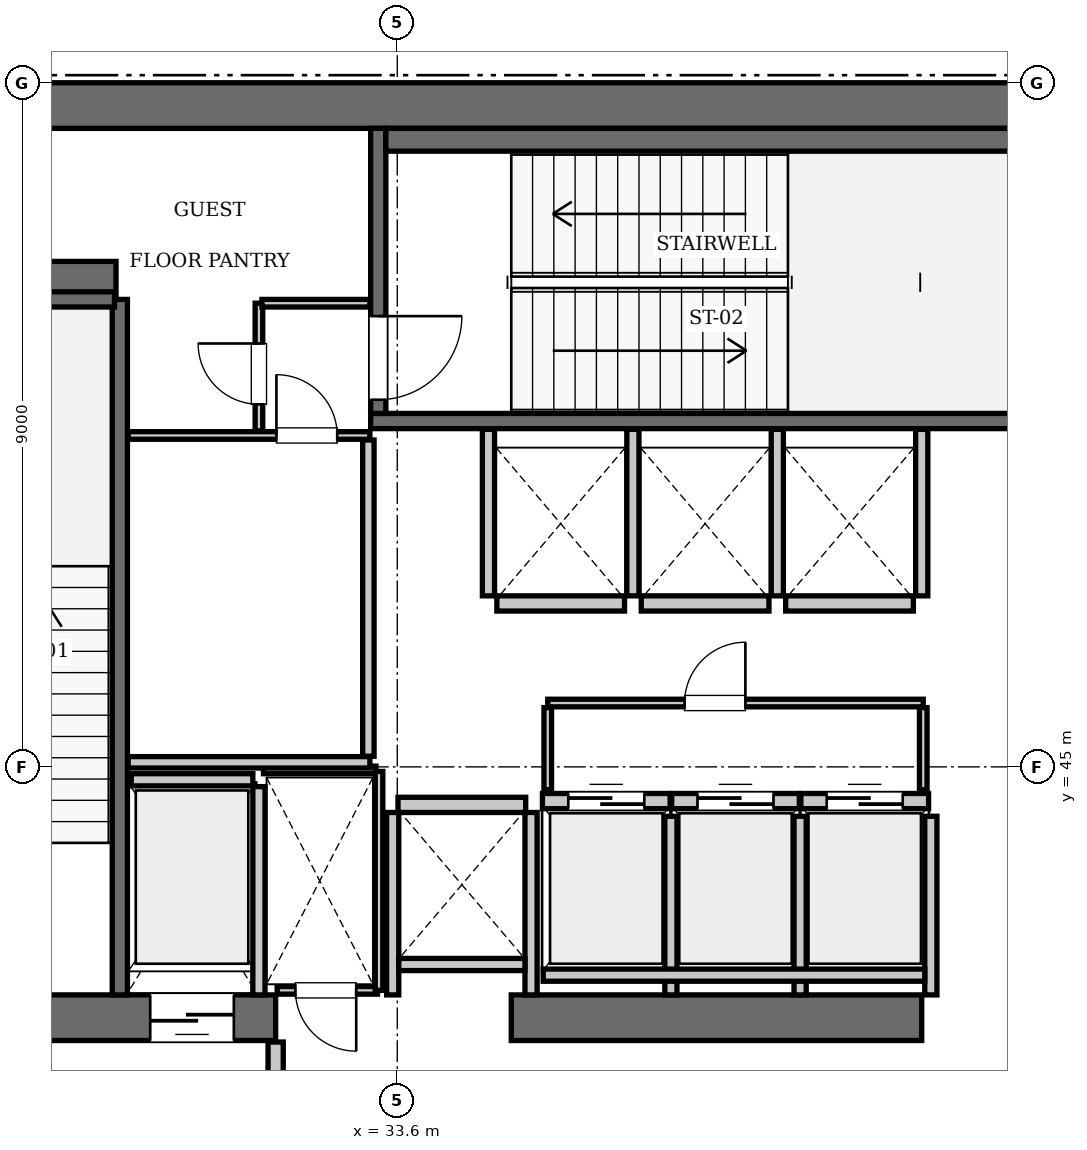
"""IFC4 building model, lengths in metres.
Left out: names, types, materials, properties, quantities, classifications, styles, units other than length and angle.
Written with IfcOpenShell. Run it as: python <this file> out.ifc"""

import sys

from ifc_helpers import new_model, si_unit, direction, frame, frame_2d, origin, place, context, subcontext, project, spatial, rectangle, extrude, element, fill, save


model = new_model("IFC4")
c1 = context("Model", 3, precision=1e-05, world=origin(), true_north=direction((0.0, 1.0)))
c2 = subcontext(c1, "Body", "Model", "MODEL_VIEW")
j1 = project(units=[si_unit("LENGTHUNIT", "METRE"), si_unit("PLANEANGLEUNIT", "RADIAN")], contexts=[c1])
p1 = place(None, origin())
s1 = spatial("IfcSite", under=j1, at=p1, CompositionType="ELEMENT")
p2 = place(p1, origin())
s2 = spatial("IfcBuilding", under=s1, at=p2, CompositionType="ELEMENT")
p3 = place(p2, frame((0.0, 0.0, 234.5)))
s3 = spatial("IfcBuildingStorey", under=s2, at=p3, CompositionType="ELEMENT", Elevation=234.5)
p4 = place(p3, frame((25.2, 53.7, 0.0), z_axis=(0.0, 0.0, 1.0), x_axis=(1.0, 0.0, 0.0)))
e1 = element("IfcWall", 1, at=p4, inside=s3, PredefinedType="SHEAR", context=c2, shape_type="SweptSolid", body=[
    extrude(rectangle(XDim=25.2, YDim=0.6, at=frame_2d((12.6, 0.0))), origin(), (0.0, 0.0, 1.0), 4.9),
])
p5 = place(p3, frame((25.2, 41.7, 0.0), z_axis=(0.0, 0.0, 1.0), x_axis=(1.0, 0.0, 0.0)))
e2 = element("IfcWall", 2, at=p5, inside=s3, PredefinedType="SHEAR", context=c2, shape_type="SweptSolid", body=[
    extrude(rectangle(XDim=6.8, YDim=0.6, at=frame_2d((3.4, 0.0))), origin(), (0.0, 0.0, 1.0), 4.9),
])
p6 = place(p5, frame((1.65, 0.0, 0.0)))
e3 = element("IfcOpeningElement", 3, at=p6, cuts=e2, PredefinedType="OPENING", context=c2, shape_type="SweptSolid", body=[
    extrude(rectangle(XDim=1.15, YDim=2.15, at=frame_2d((0.575, 1.075))), frame((0.0, 0.31, 0.0), z_axis=(0.0, -1.0, 0.0), x_axis=(1.0, 0.0, 0.0)), (0.0, 0.0, 1.0), 0.62),
])
p7 = place(p5, frame((5.15, 0.0, 0.0)))
e4 = element("IfcOpeningElement", 4, at=p7, cuts=e2, PredefinedType="OPENING", context=c2, shape_type="SweptSolid", body=[
    extrude(rectangle(XDim=1.1, YDim=2.2, at=frame_2d((0.55, 1.1))), frame((0.0, 0.31, 0.0), z_axis=(0.0, -1.0, 0.0), x_axis=(1.0, 0.0, 0.0)), (0.0, 0.0, 1.0), 0.62),
])
p8 = place(p3, frame((35.1, 41.7, 0.0), z_axis=(0.0, 0.0, 1.0), x_axis=(1.0, 0.0, 0.0)))
e5 = element("IfcWall", 5, at=p8, inside=s3, PredefinedType="SHEAR", context=c2, shape_type="SweptSolid", body=[
    extrude(rectangle(XDim=5.4, YDim=0.6, at=frame_2d((2.7, 0.0))), origin(), (0.0, 0.0, 1.0), 4.9),
])
p9 = place(p3, frame((25.8, 51.4, 0.0), z_axis=(0.0, 0.0, 1.0), x_axis=(1.0, 0.0, 0.0)))
e6 = element("IfcWall", 6, at=p9, inside=s3, PredefinedType="SHEAR", context=c2, shape_type="SweptSolid", body=[
    extrude(rectangle(XDim=4.1, YDim=0.5, at=frame_2d((2.05, 0.0))), origin(), (0.0, 0.0, 1.0), 4.9),
])
p10 = place(p3, frame((29.95, 42.0, 0.0), z_axis=(0.0, 0.0, 1.0), x_axis=(0.0, 1.0, 0.0)))
e7 = element("IfcWall", 7, at=p10, inside=s3, PredefinedType="SOLIDWALL", context=c2, shape_type="SweptSolid", body=[
    extrude(rectangle(XDim=9.15, YDim=0.2, at=frame_2d((4.575, 0.0))), origin(), (0.0, 0.0, 1.0), 4.66),
])
p11 = place(p3, frame((26.38, 51.15, 0.0), z_axis=(0.0, 0.0, 1.0), x_axis=(1.0, 0.0, 0.0)))
e8 = element("IfcWall", 8, at=p11, inside=s3, PredefinedType="SOLIDWALL", context=c2, shape_type="SweptSolid", body=[
    extrude(rectangle(XDim=3.5, YDim=0.2, at=frame_2d((1.75, 0.0))), origin(), (0.0, 0.0, 1.0), 4.66),
])
p12 = place(p3, frame((33.25, 49.55, 0.0), z_axis=(0.0, 0.0, 1.0), x_axis=(1.0, 0.0, 0.0)))
e9 = element("IfcWall", 9, at=p12, inside=s3, PredefinedType="SOLIDWALL", context=c2, shape_type="SweptSolid", body=[
    extrude(rectangle(XDim=9.1, YDim=0.2, at=frame_2d((4.55, 0.0))), origin(), (0.0, 0.0, 1.0), 4.66),
])
p13 = place(p3, frame((33.35, 49.65, 0.0), z_axis=(0.0, 0.0, 1.0), x_axis=(0.0, 1.0, 0.0)))
e10 = element("IfcWall", 10, at=p13, inside=s3, PredefinedType="SOLIDWALL", context=c2, shape_type="SweptSolid", body=[
    extrude(rectangle(XDim=3.75, YDim=0.2, at=frame_2d((1.875, 0.0))), origin(), (0.0, 0.0, 1.0), 4.66),
])
p14 = place(p13, frame((0.18, 0.0, 0.0)))
e11 = element("IfcOpeningElement", 11, at=p14, cuts=e10, PredefinedType="OPENING", context=c2, shape_type="SweptSolid", body=[
    extrude(rectangle(XDim=1.1, YDim=2.15, at=frame_2d((0.55, 1.075))), frame((0.0, 0.11, 0.0), z_axis=(0.0, -1.0, 0.0), x_axis=(1.0, 0.0, 0.0)), (0.0, 0.0, 1.0), 0.22),
])
p15 = place(p3, frame((33.45, 53.25, 0.0), z_axis=(0.0, 0.0, 1.0), x_axis=(1.0, 0.0, 0.0)))
e12 = element("IfcWall", 12, at=p15, inside=s3, PredefinedType="SOLIDWALL", context=c2, shape_type="SweptSolid", body=[
    extrude(rectangle(XDim=8.7, YDim=0.3, at=frame_2d((4.35, 0.0))), origin(), (0.0, 0.0, 1.0), 4.66),
])
p16 = place(p3, frame((35.51, 44.55, 0.0), z_axis=(0.0, 0.0, 1.0), x_axis=(1.0, 0.0, 0.0)))
e13 = element("IfcWall", 13, at=p16, inside=s3, PredefinedType="SOLIDWALL", context=c2, shape_type="SweptSolid", body=[
    extrude(rectangle(XDim=1.68, YDim=0.2, at=frame_2d((0.84, 0.0))), origin(), (0.0, 0.0, 1.0), 4.66),
])
p17 = place(p16, frame((0.34, 0.0, 0.0)))
e14 = element("IfcOpeningElement", 14, at=p17, cuts=e13, PredefinedType="OPENING", context=c2, shape_type="SweptSolid", body=[
    extrude(rectangle(XDim=1.0, YDim=2.15, at=frame_2d((0.5, 1.075))), frame((0.0, 0.11, 0.0), z_axis=(0.0, -1.0, 0.0), x_axis=(1.0, 0.0, 0.0)), (0.0, 0.0, 1.0), 0.22),
])
p18 = place(p3, frame((37.21, 44.55, 0.0), z_axis=(0.0, 0.0, 1.0), x_axis=(1.0, 0.0, 0.0)))
e15 = element("IfcWall", 15, at=p18, inside=s3, PredefinedType="SOLIDWALL", context=c2, shape_type="SweptSolid", body=[
    extrude(rectangle(XDim=1.68, YDim=0.2, at=frame_2d((0.84, 0.0))), origin(), (0.0, 0.0, 1.0), 4.66),
])
p19 = place(p18, frame((0.34, 0.0, 0.0)))
e16 = element("IfcOpeningElement", 16, at=p19, cuts=e15, PredefinedType="OPENING", context=c2, shape_type="SweptSolid", body=[
    extrude(rectangle(XDim=1.0, YDim=2.15, at=frame_2d((0.5, 1.075))), frame((0.0, 0.11, 0.0), z_axis=(0.0, -1.0, 0.0), x_axis=(1.0, 0.0, 0.0)), (0.0, 0.0, 1.0), 0.22),
])
p20 = place(p3, frame((38.91, 44.55, 0.0), z_axis=(0.0, 0.0, 1.0), x_axis=(1.0, 0.0, 0.0)))
e17 = element("IfcWall", 17, at=p20, inside=s3, PredefinedType="SOLIDWALL", context=c2, shape_type="SweptSolid", body=[
    extrude(rectangle(XDim=1.68, YDim=0.2, at=frame_2d((0.84, 0.0))), origin(), (0.0, 0.0, 1.0), 4.66),
])
p21 = place(p20, frame((0.34, 0.0, 0.0)))
e18 = element("IfcOpeningElement", 18, at=p21, cuts=e17, PredefinedType="OPENING", context=c2, shape_type="SweptSolid", body=[
    extrude(rectangle(XDim=1.0, YDim=2.15, at=frame_2d((0.5, 1.075))), frame((0.0, 0.11, 0.0), z_axis=(0.0, -1.0, 0.0), x_axis=(1.0, 0.0, 0.0)), (0.0, 0.0, 1.0), 0.22),
])
p22 = place(p3, frame((34.91, 47.15, 0.0), z_axis=(0.0, 0.0, 1.0), x_axis=(1.0, 0.0, 0.0)))
e19 = element("IfcWall", 19, at=p22, inside=s3, PredefinedType="SOLIDWALL", context=c2, shape_type="SweptSolid", body=[
    extrude(rectangle(XDim=1.68, YDim=0.2, at=frame_2d((0.84, 0.0))), origin(), (0.0, 0.0, 1.0), 4.66),
])
for number, where, z_axis, x_axis in (
    (20, (36.81, 47.15, 0.0), (0.0, 0.0, 1.0), (1.0, 0.0, 0.0)),
    (21, (38.71, 47.15, 0.0), (0.0, 0.0, 1.0), (1.0, 0.0, 0.0)),
    (22, (33.61, 44.5, 0.0), (0.0, 0.0, 1.0), (1.0, 0.0, 0.0)),
):
    element("IfcWall", number, at=place(p3, frame(where, z_axis=z_axis, x_axis=x_axis)), inside=s3, PredefinedType="SOLIDWALL", context=c2, shape_type="SweptSolid", body=[
        extrude(rectangle(XDim=1.68, YDim=0.2, at=frame_2d((0.84, 0.0))), origin(), (0.0, 0.0, 1.0), 4.66),
    ])
p23 = place(p3, frame((30.1, 44.83, 0.0), z_axis=(0.0, 0.0, 1.0), x_axis=(1.0, 0.0, 0.0)))
e23 = element("IfcWall", 23, at=p23, inside=s3, PredefinedType="SOLIDWALL", context=c2, shape_type="SweptSolid", body=[
    extrude(rectangle(XDim=1.6, YDim=0.16, at=frame_2d((0.8, 0.0))), origin(), (0.0, 0.0, 1.0), 4.66),
])
p24 = place(p3, frame((31.78, 42.0, 0.0), z_axis=(0.0, 0.0, 1.0), x_axis=(0.0, 1.0, 0.0)))
e24 = element("IfcWall", 24, at=p24, inside=s3, PredefinedType="SOLIDWALL", context=c2, shape_type="SweptSolid", body=[
    extrude(rectangle(XDim=2.74, YDim=0.16, at=frame_2d((1.37, 0.0))), origin(), (0.0, 0.0, 1.0), 4.66),
])
for number, where, z_axis, x_axis in (
    (25, (37.2, 42.0, 0.0), (0.0, 0.0, 1.0), (0.0, 1.0, 0.0)),
    (26, (38.9, 42.0, 0.0), (0.0, 0.0, 1.0), (0.0, 1.0, 0.0)),
    (27, (40.62, 42.0, 0.0), (0.0, 0.0, 1.0), (0.0, 1.0, 0.0)),
):
    element("IfcWall", number, at=place(p3, frame(where, z_axis=z_axis, x_axis=x_axis)), inside=s3, PredefinedType="SOLIDWALL", context=c2, shape_type="SweptSolid", body=[
        extrude(rectangle(XDim=2.35, YDim=0.16, at=frame_2d((1.175, 0.0))), origin(), (0.0, 0.0, 1.0), 4.66),
    ])
p25 = place(p3, frame((35.52, 42.26, 0.0), z_axis=(0.0, 0.0, 1.0), x_axis=(1.0, 0.0, 0.0)))
e28 = element("IfcWall", 28, at=p25, inside=s3, PredefinedType="SOLIDWALL", context=c2, shape_type="SweptSolid", body=[
    extrude(rectangle(XDim=5.02, YDim=0.16, at=frame_2d((2.51, 0.0))), origin(), (0.0, 0.0, 1.0), 4.66),
])
for number, where, z_axis, x_axis in (
    (29, (34.8, 47.25, 0.0), (0.0, 0.0, 1.0), (0.0, 1.0, 0.0)),
    (30, (36.7, 47.25, 0.0), (0.0, 0.0, 1.0), (0.0, 1.0, 0.0)),
    (31, (38.6, 47.25, 0.0), (0.0, 0.0, 1.0), (0.0, 1.0, 0.0)),
    (32, (40.5, 47.25, 0.0), (0.0, 0.0, 1.0), (0.0, 1.0, 0.0)),
):
    element("IfcWall", number, at=place(p3, frame(where, z_axis=z_axis, x_axis=x_axis)), inside=s3, PredefinedType="SOLIDWALL", context=c2, shape_type="SweptSolid", body=[
        extrude(rectangle(XDim=2.19, YDim=0.16, at=frame_2d((1.095, 0.0))), origin(), (0.0, 0.0, 1.0), 4.66),
    ])
for number, where, z_axis, x_axis in (
    (33, (33.54, 42.0, 0.0), (0.0, 0.0, 1.0), (0.0, 1.0, 0.0)),
    (34, (35.36, 42.0, 0.0), (0.0, 0.0, 1.0), (0.0, 1.0, 0.0)),
):
    element("IfcWall", number, at=place(p3, frame(where, z_axis=z_axis, x_axis=x_axis)), inside=s3, PredefinedType="SOLIDWALL", context=c2, shape_type="SweptSolid", body=[
        extrude(rectangle(XDim=2.4, YDim=0.16, at=frame_2d((1.2, 0.0))), origin(), (0.0, 0.0, 1.0), 4.66),
    ])
p26 = place(p3, frame((33.62, 42.4, 0.0), z_axis=(0.0, 0.0, 1.0), x_axis=(1.0, 0.0, 0.0)))
e35 = element("IfcWall", 35, at=p26, inside=s3, PredefinedType="SOLIDWALL", context=c2, shape_type="SweptSolid", body=[
    extrude(rectangle(XDim=1.66, YDim=0.16, at=frame_2d((0.83, 0.0))), origin(), (0.0, 0.0, 1.0), 4.66),
])
p27 = place(p3, frame((32.0, 38.31, 0.0), z_axis=(0.0, 0.0, 1.0), x_axis=(0.0, 1.0, 0.0)))
e36 = element("IfcWall", 36, at=p27, inside=s3, PredefinedType="PARTITIONING", context=c2, shape_type="SweptSolid", body=[
    extrude(rectangle(XDim=3.07, YDim=0.2, at=frame_2d((1.535, 0.0))), origin(), (0.0, 0.0, 1.0), 4.66),
])
p28 = place(p3, frame((32.02, 42.06, 0.0), z_axis=(0.0, 0.0, 1.0), x_axis=(1.0, 0.0, 0.0)))
e37 = element("IfcWall", 37, at=p28, inside=s3, PredefinedType="PARTITIONING", context=c2, shape_type="SweptSolid", body=[
    extrude(rectangle(XDim=1.32, YDim=0.1, at=frame_2d((0.66, 0.0))), origin(), (0.0, 0.0, 1.0), 4.66),
])
p29 = place(p28, frame((0.24, 0.0, 0.0)))
e38 = element("IfcOpeningElement", 38, at=p29, cuts=e37, PredefinedType="OPENING", context=c2, shape_type="SweptSolid", body=[
    extrude(rectangle(XDim=0.8, YDim=2.05, at=frame_2d((0.4, 1.025))), frame((0.0, 0.06, 0.0), z_axis=(0.0, -1.0, 0.0), x_axis=(1.0, 0.0, 0.0)), (0.0, 0.0, 1.0), 0.12),
])
p30 = place(p3, frame((31.84, 44.96, 0.0), z_axis=(0.0, 0.0, 1.0), x_axis=(1.0, 0.0, 0.0)))
e39 = element("IfcWall", 39, at=p30, inside=s3, PredefinedType="PARTITIONING", context=c2, shape_type="SweptSolid", body=[
    extrude(rectangle(XDim=1.48, YDim=0.1, at=frame_2d((0.74, 0.0))), origin(), (0.0, 0.0, 1.0), 4.66),
])
p31 = place(p3, frame((33.36, 42.06, 0.0), z_axis=(0.0, 0.0, 1.0), x_axis=(0.0, 1.0, 0.0)))
e40 = element("IfcWall", 40, at=p31, inside=s3, PredefinedType="PARTITIONING", context=c2, shape_type="SweptSolid", body=[
    extrude(rectangle(XDim=2.88, YDim=0.1, at=frame_2d((1.44, 0.0))), origin(), (0.0, 0.0, 1.0), 4.66),
])
p32 = place(p3, frame((35.58, 45.84, 0.0), z_axis=(0.0, 0.0, 1.0), x_axis=(1.0, 0.0, 0.0)))
e41 = element("IfcWall", 41, at=p32, inside=s3, PredefinedType="PARTITIONING", context=c2, shape_type="SweptSolid", body=[
    extrude(rectangle(XDim=4.94, YDim=0.1, at=frame_2d((2.47, 0.0))), origin(), (0.0, 0.0, 1.0), 4.66),
])
p33 = place(p32, frame((1.8, 0.0, 0.0)))
e42 = element("IfcOpeningElement", 42, at=p33, cuts=e41, PredefinedType="OPENING", context=c2, shape_type="SweptSolid", body=[
    extrude(rectangle(XDim=0.8, YDim=2.05, at=frame_2d((0.4, 1.025))), frame((0.0, 0.06, 0.0), z_axis=(0.0, -1.0, 0.0), x_axis=(1.0, 0.0, 0.0)), (0.0, 0.0, 1.0), 0.12),
])
for number, where, z_axis, x_axis in (
    (43, (35.58, 44.7, 0.0), (0.0, 0.0, 1.0), (0.0, 1.0, 0.0)),
    (44, (40.52, 44.7, 0.0), (0.0, 0.0, 1.0), (0.0, 1.0, 0.0)),
):
    element("IfcWall", number, at=place(p3, frame(where, z_axis=z_axis, x_axis=x_axis)), inside=s3, PredefinedType="PARTITIONING", context=c2, shape_type="SweptSolid", body=[
        extrude(rectangle(XDim=1.08, YDim=0.1, at=frame_2d((0.54, 0.0))), origin(), (0.0, 0.0, 1.0), 4.66),
    ])
p34 = place(p3, frame((30.06, 45.06, 0.0), z_axis=(0.0, 0.0, 1.0), x_axis=(1.0, 0.0, 0.0)))
e45 = element("IfcWall", 45, at=p34, inside=s3, PredefinedType="PARTITIONING", context=c2, shape_type="SweptSolid", body=[
    extrude(rectangle(XDim=3.18, YDim=0.15, at=frame_2d((1.59, 0.0))), origin(), (0.0, 0.0, 1.0), 4.66),
])
p35 = place(p3, frame((33.22, 45.14, 0.0), z_axis=(0.0, 0.0, 1.0), x_axis=(0.0, 1.0, 0.0)))
e46 = element("IfcWall", 46, at=p35, inside=s3, PredefinedType="PARTITIONING", context=c2, shape_type="SweptSolid", body=[
    extrude(rectangle(XDim=4.16, YDim=0.15, at=frame_2d((2.08, 0.0))), origin(), (0.0, 0.0, 1.0), 4.66),
])
p36 = place(p3, frame((30.06, 49.36, 0.0), z_axis=(0.0, 0.0, 1.0), x_axis=(1.0, 0.0, 0.0)))
e47 = element("IfcWall", 47, at=p36, inside=s3, PredefinedType="PARTITIONING", context=c2, shape_type="SweptSolid", body=[
    extrude(rectangle(XDim=3.18, YDim=0.1, at=frame_2d((1.59, 0.0))), origin(), (0.0, 0.0, 1.0), 4.66),
])
p37 = place(p36, frame((1.95, 0.0, 0.0)))
e48 = element("IfcOpeningElement", 48, at=p37, cuts=e47, PredefinedType="OPENING", context=c2, shape_type="SweptSolid", body=[
    extrude(rectangle(XDim=0.8, YDim=2.05, at=frame_2d((0.4, 1.025))), frame((0.0, 0.06, 0.0), z_axis=(0.0, -1.0, 0.0), x_axis=(1.0, 0.0, 0.0)), (0.0, 0.0, 1.0), 0.12),
])
p38 = place(p3, frame((31.78, 49.42, 0.0), z_axis=(0.0, 0.0, 1.0), x_axis=(0.0, 1.0, 0.0)))
e49 = element("IfcWall", 49, at=p38, inside=s3, PredefinedType="PARTITIONING", context=c2, shape_type="SweptSolid", body=[
    extrude(rectangle(XDim=1.68, YDim=0.1, at=frame_2d((0.84, 0.0))), origin(), (0.0, 0.0, 1.0), 4.66),
])
p39 = place(p38, frame((0.35, 0.0, 0.0)))
e50 = element("IfcOpeningElement", 50, at=p39, cuts=e49, PredefinedType="OPENING", context=c2, shape_type="SweptSolid", body=[
    extrude(rectangle(XDim=0.8, YDim=2.05, at=frame_2d((0.4, 1.025))), frame((0.0, 0.06, 0.0), z_axis=(0.0, -1.0, 0.0), x_axis=(1.0, 0.0, 0.0)), (0.0, 0.0, 1.0), 0.12),
])
p40 = place(p3, frame((31.82, 51.1, 0.0), z_axis=(0.0, 0.0, 1.0), x_axis=(1.0, 0.0, 0.0)))
e51 = element("IfcWall", 51, at=p40, inside=s3, PredefinedType="PARTITIONING", context=c2, shape_type="SweptSolid", body=[
    extrude(rectangle(XDim=1.42, YDim=0.1, at=frame_2d((0.71, 0.0))), origin(), (0.0, 0.0, 1.0), 4.66),
])
p41 = place(p14, frame((1.1, 0.0, 0.0), z_axis=(0.0, 0.0, 1.0), x_axis=(-1.0, 0.0, 0.0)))
e52 = element("IfcDoor", 52, at=p41, inside=s3, OperationType="SINGLE_SWING_LEFT", PredefinedType="DOOR", context=c2, shape_type="SweptSolid", body=[
    extrude(rectangle(XDim=1.1, YDim=2.15, at=frame_2d((0.55, 1.075))), frame((0.0, 0.025, 0.0), z_axis=(0.0, -1.0, 0.0), x_axis=(1.0, 0.0, 0.0)), (0.0, 0.0, 1.0), 0.05),
])
fill(e11, e52)
p42 = place(p17, origin())
e53 = element("IfcDoor", 53, at=p42, inside=s3, OperationType="SLIDING_TO_LEFT", PredefinedType="DOOR", context=c2, shape_type="SweptSolid", body=[
    extrude(rectangle(XDim=1.0, YDim=2.15, at=frame_2d((0.5, 1.075))), frame((0.0, 0.025, 0.0), z_axis=(0.0, -1.0, 0.0), x_axis=(1.0, 0.0, 0.0)), (0.0, 0.0, 1.0), 0.05),
])
fill(e14, e53)
p43 = place(p19, origin())
e54 = element("IfcDoor", 54, at=p43, inside=s3, OperationType="SLIDING_TO_LEFT", PredefinedType="DOOR", context=c2, shape_type="SweptSolid", body=[
    extrude(rectangle(XDim=1.0, YDim=2.15, at=frame_2d((0.5, 1.075))), frame((0.0, 0.025, 0.0), z_axis=(0.0, -1.0, 0.0), x_axis=(1.0, 0.0, 0.0)), (0.0, 0.0, 1.0), 0.05),
])
fill(e16, e54)
p44 = place(p21, origin())
e55 = element("IfcDoor", 55, at=p44, inside=s3, OperationType="SLIDING_TO_LEFT", PredefinedType="DOOR", context=c2, shape_type="SweptSolid", body=[
    extrude(rectangle(XDim=1.0, YDim=2.15, at=frame_2d((0.5, 1.075))), frame((0.0, 0.025, 0.0), z_axis=(0.0, -1.0, 0.0), x_axis=(1.0, 0.0, 0.0)), (0.0, 0.0, 1.0), 0.05),
])
fill(e18, e55)
p45 = place(p7, frame((1.1, 0.0, 0.0), z_axis=(0.0, 0.0, 1.0), x_axis=(-1.0, 0.0, 0.0)))
e56 = element("IfcDoor", 56, at=p45, inside=s3, OperationType="SLIDING_TO_LEFT", PredefinedType="DOOR", context=c2, shape_type="SweptSolid", body=[
    extrude(rectangle(XDim=1.1, YDim=2.2, at=frame_2d((0.55, 1.1))), frame((0.0, 0.025, 0.0), z_axis=(0.0, -1.0, 0.0), x_axis=(1.0, 0.0, 0.0)), (0.0, 0.0, 1.0), 0.05),
])
fill(e4, e56)
p46 = place(p29, frame((0.8, 0.0, 0.0), z_axis=(0.0, 0.0, 1.0), x_axis=(-1.0, 0.0, 0.0)))
e57 = element("IfcDoor", 57, at=p46, inside=s3, OperationType="SINGLE_SWING_LEFT", PredefinedType="DOOR", context=c2, shape_type="SweptSolid", body=[
    extrude(rectangle(XDim=0.8, YDim=2.05, at=frame_2d((0.4, 1.025))), frame((0.0, 0.025, 0.0), z_axis=(0.0, -1.0, 0.0), x_axis=(1.0, 0.0, 0.0)), (0.0, 0.0, 1.0), 0.05),
])
fill(e38, e57)
p47 = place(p33, origin())
e58 = element("IfcDoor", 58, at=p47, inside=s3, OperationType="SINGLE_SWING_RIGHT", PredefinedType="DOOR", context=c2, shape_type="SweptSolid", body=[
    extrude(rectangle(XDim=0.8, YDim=2.05, at=frame_2d((0.4, 1.025))), frame((0.0, 0.025, 0.0), z_axis=(0.0, -1.0, 0.0), x_axis=(1.0, 0.0, 0.0)), (0.0, 0.0, 1.0), 0.05),
])
fill(e42, e58)
p48 = place(p37, origin())
e59 = element("IfcDoor", 59, at=p48, inside=s3, OperationType="SINGLE_SWING_LEFT", PredefinedType="DOOR", context=c2, shape_type="SweptSolid", body=[
    extrude(rectangle(XDim=0.8, YDim=2.05, at=frame_2d((0.4, 1.025))), frame((0.0, 0.025, 0.0), z_axis=(0.0, -1.0, 0.0), x_axis=(1.0, 0.0, 0.0)), (0.0, 0.0, 1.0), 0.05),
])
fill(e48, e59)
p49 = place(p39, origin())
e60 = element("IfcDoor", 60, at=p49, inside=s3, OperationType="SINGLE_SWING_RIGHT", PredefinedType="DOOR", context=c2, shape_type="SweptSolid", body=[
    extrude(rectangle(XDim=0.8, YDim=2.05, at=frame_2d((0.4, 1.025))), frame((0.0, 0.025, 0.0), z_axis=(0.0, -1.0, 0.0), x_axis=(1.0, 0.0, 0.0)), (0.0, 0.0, 1.0), 0.05),
])
fill(e50, e60)
save(model, sys.argv[1])
